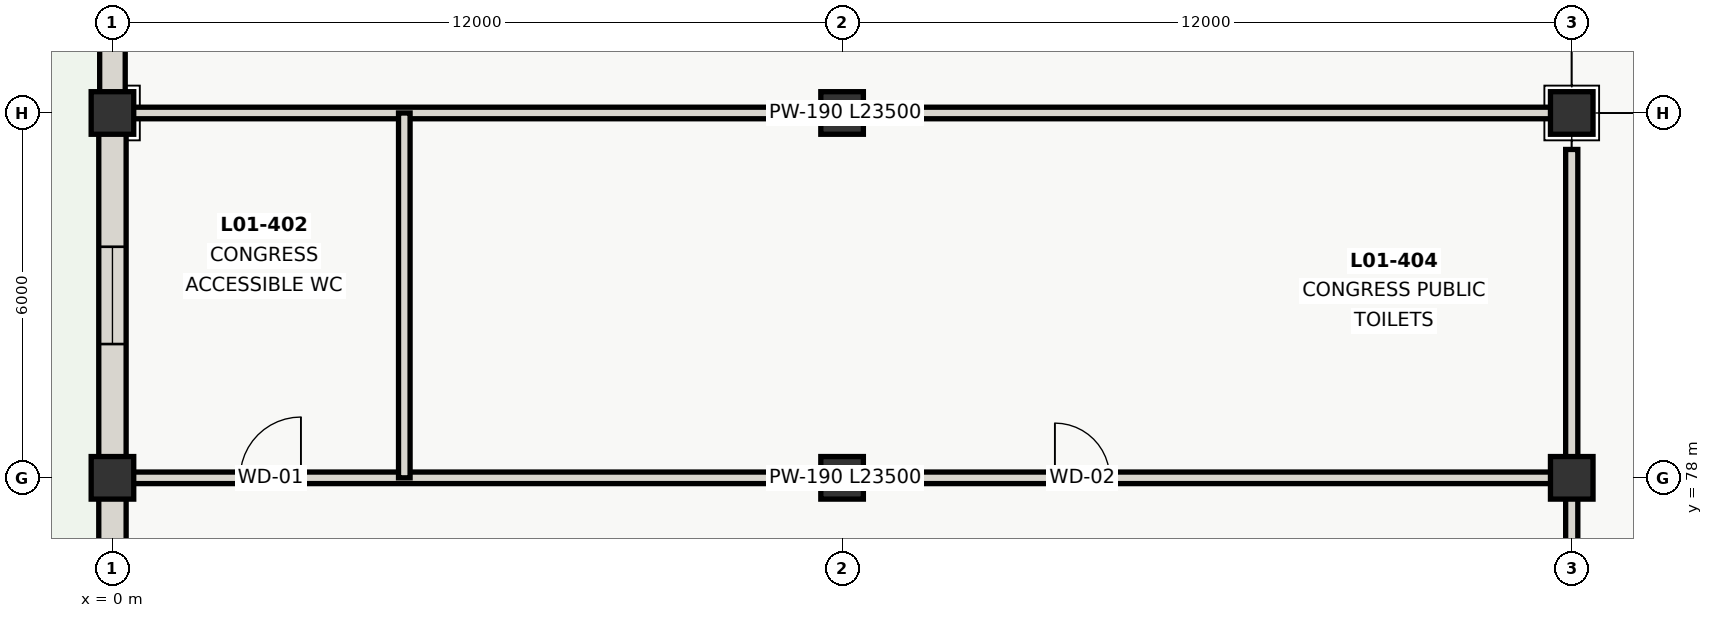
"""IFC4 building model, lengths in metres.
Left out: names, types, materials, properties, quantities, classifications, styles, units other than length and angle.
Written with IfcOpenShell. Run it as: python <this file> out.ifc"""

import sys

from ifc_helpers import new_model, si_unit, direction, frame, frame_2d, origin, origin_2d, place, context, subcontext, project, spatial, rectangle, extrude, element, fill, save


model = new_model("IFC4")
c1 = context("Model", 3, precision=1e-05, world=origin(), true_north=direction((0.0, 1.0)))
c2 = subcontext(c1, "Body", "Model", "MODEL_VIEW")
j1 = project(units=[si_unit("LENGTHUNIT", "METRE"), si_unit("PLANEANGLEUNIT", "RADIAN")], contexts=[c1])
p1 = place(None, origin())
s1 = spatial("IfcSite", under=j1, at=p1, CompositionType="ELEMENT")
p2 = place(p1, origin())
s2 = spatial("IfcBuilding", under=s1, at=p2, CompositionType="ELEMENT")
p3 = place(p2, origin())
s3 = spatial("IfcBuildingStorey", under=s2, at=p3, CompositionType="ELEMENT", Elevation=0.0)
for number, where, z_axis, x_axis in (
    (1, (0.0, 78.0, 0.0), (0.0, 0.0, 1.0), (1.0, 0.0, 0.0)),
    (2, (12.0, 78.0, 0.0), (0.0, 0.0, 1.0), (1.0, 0.0, 0.0)),
    (3, (24.0, 78.0, 0.0), (0.0, 0.0, 1.0), (1.0, 0.0, 0.0)),
    (4, (0.0, 84.0, 0.0), (0.0, 0.0, 1.0), (1.0, 0.0, 0.0)),
    (5, (12.0, 84.0, 0.0), (0.0, 0.0, 1.0), (1.0, 0.0, 0.0)),
    (6, (24.0, 84.0, 0.0), (0.0, 0.0, 1.0), (1.0, 0.0, 0.0)),
):
    element("IfcColumn", number, at=place(p3, frame(where, z_axis=z_axis, x_axis=x_axis)), inside=s3, PredefinedType="COLUMN", context=c2, shape_type="SweptSolid", body=[
        extrude(rectangle(XDim=0.7, YDim=0.7, at=origin_2d()), origin(), (0.0, 0.0, 1.0), 4.2),
    ])
p4 = place(p3, frame((0.0, 72.0, 0.0), z_axis=(0.0, 0.0, 1.0), x_axis=(0.0, 1.0, 0.0)))
e7 = element("IfcWall", 7, at=p4, inside=s3, PredefinedType="SOLIDWALL", context=c2, shape_type="SweptSolid", body=[
    extrude(rectangle(XDim=6.0, YDim=0.45, at=frame_2d((3.0, 0.0))), origin(), (0.0, 0.0, 1.0), 3.55),
])
p5 = place(p4, frame((2.2, 0.0, 0.9)))
e8 = element("IfcOpeningElement", 8, at=p5, cuts=e7, PredefinedType="OPENING", context=c2, shape_type="SweptSolid", body=[
    extrude(rectangle(XDim=1.6, YDim=2.0, at=frame_2d((0.8, 1.0))), frame((0.0, 0.235, 0.0), z_axis=(0.0, -1.0, 0.0), x_axis=(1.0, 0.0, 0.0)), (0.0, 0.0, 1.0), 0.47),
])
p6 = place(p3, frame((0.0, 78.0, 0.0), z_axis=(0.0, 0.0, 1.0), x_axis=(0.0, 1.0, 0.0)))
e9 = element("IfcWall", 9, at=p6, inside=s3, PredefinedType="SOLIDWALL", context=c2, shape_type="SweptSolid", body=[
    extrude(rectangle(XDim=6.0, YDim=0.45, at=frame_2d((3.0, 0.0))), origin(), (0.0, 0.0, 1.0), 3.55),
])
p7 = place(p6, frame((2.2, 0.0, 0.9)))
e10 = element("IfcOpeningElement", 10, at=p7, cuts=e9, PredefinedType="OPENING", context=c2, shape_type="SweptSolid", body=[
    extrude(rectangle(XDim=1.6, YDim=2.0, at=frame_2d((0.8, 1.0))), frame((0.0, 0.235, 0.0), z_axis=(0.0, -1.0, 0.0), x_axis=(1.0, 0.0, 0.0)), (0.0, 0.0, 1.0), 0.47),
])
p8 = place(p3, frame((0.0, 84.0, 0.0), z_axis=(0.0, 0.0, 1.0), x_axis=(0.0, 1.0, 0.0)))
e11 = element("IfcWall", 11, at=p8, inside=s3, PredefinedType="SOLIDWALL", context=c2, shape_type="SweptSolid", body=[
    extrude(rectangle(XDim=4.4, YDim=0.42, at=frame_2d((2.2, 0.0))), origin(), (0.0, 0.0, 1.0), 3.34),
])
p9 = place(p8, frame((1.3, 0.0, 0.9)))
e12 = element("IfcOpeningElement", 12, at=p9, cuts=e11, PredefinedType="OPENING", context=c2, shape_type="SweptSolid", body=[
    extrude(rectangle(XDim=1.8, YDim=2.05, at=frame_2d((0.9, 1.025))), frame((0.0, 0.22, 0.0), z_axis=(0.0, -1.0, 0.0), x_axis=(1.0, 0.0, 0.0)), (0.0, 0.0, 1.0), 0.44),
])
p10 = place(p3, frame((24.0, 46.8, 0.0), z_axis=(0.0, 0.0, 1.0), x_axis=(0.0, 1.0, 0.0)))
e13 = element("IfcWall", 13, at=p10, inside=s3, PredefinedType="PARTITIONING", context=c2, shape_type="SweptSolid", body=[
    extrude(rectangle(XDim=36.6, YDim=0.2, at=frame_2d((18.3, 0.0))), origin(), (0.0, 0.0, 1.0), 3.24),
])
p11 = place(p10, frame((10.0, 0.0, 0.0)))
e14 = element("IfcOpeningElement", 14, at=p11, cuts=e13, PredefinedType="OPENING", context=c2, shape_type="SweptSolid", body=[
    extrude(rectangle(XDim=2.0, YDim=2.25, at=frame_2d((1.0, 1.125))), frame((0.0, 0.11, 0.0), z_axis=(0.0, -1.0, 0.0), x_axis=(1.0, 0.0, 0.0)), (0.0, 0.0, 1.0), 0.22),
])
p12 = place(p10, frame((26.0, 0.0, 0.0)))
e15 = element("IfcOpeningElement", 15, at=p12, cuts=e13, PredefinedType="OPENING", context=c2, shape_type="SweptSolid", body=[
    extrude(rectangle(XDim=2.0, YDim=2.25, at=frame_2d((1.0, 1.125))), frame((0.0, 0.11, 0.0), z_axis=(0.0, -1.0, 0.0), x_axis=(1.0, 0.0, 0.0)), (0.0, 0.0, 1.0), 0.22),
])
p13 = place(p3, frame((0.3, 78.0, 0.0), z_axis=(0.0, 0.0, 1.0), x_axis=(1.0, 0.0, 0.0)))
e16 = element("IfcWall", 16, at=p13, inside=s3, PredefinedType="PLUMBINGWALL", context=c2, shape_type="SweptSolid", body=[
    extrude(rectangle(XDim=23.5, YDim=0.19, at=frame_2d((11.75, 0.0))), origin(), (0.0, 0.0, 1.0), 3.39),
])
p14 = place(p13, frame((1.8, 0.0, 0.0)))
e17 = element("IfcOpeningElement", 17, at=p14, cuts=e16, PredefinedType="OPENING", context=c2, shape_type="SweptSolid", body=[
    extrude(rectangle(XDim=1.0, YDim=2.1, at=frame_2d((0.5, 1.05))), frame((0.0, 0.105, 0.0), z_axis=(0.0, -1.0, 0.0), x_axis=(1.0, 0.0, 0.0)), (0.0, 0.0, 1.0), 0.21),
])
p15 = place(p13, frame((15.2, 0.0, 0.0)))
e18 = element("IfcOpeningElement", 18, at=p15, cuts=e16, PredefinedType="OPENING", context=c2, shape_type="SweptSolid", body=[
    extrude(rectangle(XDim=0.9, YDim=2.05, at=frame_2d((0.45, 1.025))), frame((0.0, 0.105, 0.0), z_axis=(0.0, -1.0, 0.0), x_axis=(1.0, 0.0, 0.0)), (0.0, 0.0, 1.0), 0.21),
])
p16 = place(p3, frame((0.3, 84.0, 0.0), z_axis=(0.0, 0.0, 1.0), x_axis=(1.0, 0.0, 0.0)))
e19 = element("IfcWall", 19, at=p16, inside=s3, PredefinedType="PLUMBINGWALL", context=c2, shape_type="SweptSolid", body=[
    extrude(rectangle(XDim=23.5, YDim=0.19, at=frame_2d((11.75, 0.0))), origin(), (0.0, 0.0, 1.0), 3.55),
])
p17 = place(p3, frame((4.8, 78.0, 0.0), z_axis=(0.0, 0.0, 1.0), x_axis=(0.0, 1.0, 0.0)))
e20 = element("IfcWall", 20, at=p17, inside=s3, PredefinedType="PLUMBINGWALL", context=c2, shape_type="SweptSolid", body=[
    extrude(rectangle(XDim=6.0, YDim=0.19, at=frame_2d((3.0, 0.0))), origin(), (0.0, 0.0, 1.0), 3.72),
])
p18 = place(p7, origin())
e21 = element("IfcWindow", 21, at=p18, inside=s3, PartitioningType="SINGLE_PANEL", PredefinedType="WINDOW", context=c2, shape_type="SweptSolid", body=[
    extrude(rectangle(XDim=1.6, YDim=2.0, at=frame_2d((0.8, 1.0))), frame((0.0, 0.03, 0.0), z_axis=(0.0, -1.0, 0.0), x_axis=(1.0, 0.0, 0.0)), (0.0, 0.0, 1.0), 0.06),
])
fill(e10, e21)
p19 = place(p14, origin())
e22 = element("IfcDoor", 22, at=p19, inside=s3, OperationType="SINGLE_SWING_RIGHT", PredefinedType="DOOR", context=c2, shape_type="SweptSolid", body=[
    extrude(rectangle(XDim=1.0, YDim=2.1, at=frame_2d((0.5, 1.05))), frame((0.0, 0.025, 0.0), z_axis=(0.0, -1.0, 0.0), x_axis=(1.0, 0.0, 0.0)), (0.0, 0.0, 1.0), 0.05),
])
fill(e17, e22)
p20 = place(p15, origin())
e23 = element("IfcDoor", 23, at=p20, inside=s3, OperationType="SINGLE_SWING_LEFT", PredefinedType="DOOR", context=c2, shape_type="SweptSolid", body=[
    extrude(rectangle(XDim=0.9, YDim=2.05, at=frame_2d((0.45, 1.025))), frame((0.0, 0.025, 0.0), z_axis=(0.0, -1.0, 0.0), x_axis=(1.0, 0.0, 0.0)), (0.0, 0.0, 1.0), 0.05),
])
fill(e18, e23)
save(model, sys.argv[1])
